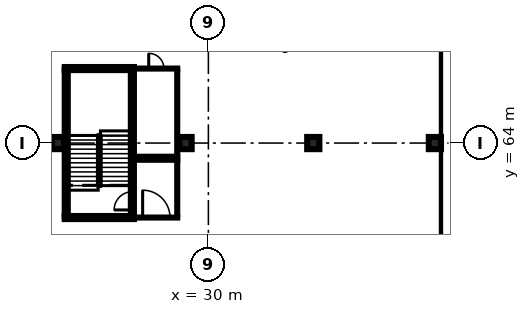
"""IFC4 building model, lengths in metres.
Left out: names, types, materials, properties, quantities, classifications, styles, units other than length and angle.
Written with IfcOpenShell. Run it as: python <this file> out.ifc"""

import sys

from ifc_helpers import new_model, si_unit, direction, frame, frame_2d, origin, origin_2d, place, context, subcontext, project, spatial, rectangle, extrude, element, fill, save


model = new_model("IFC4")
c1 = context("Model", 3, precision=1e-05, world=origin(), true_north=direction((0.0, 1.0)))
c2 = subcontext(c1, "Body", "Model", "MODEL_VIEW")
j1 = project(units=[si_unit("LENGTHUNIT", "METRE"), si_unit("PLANEANGLEUNIT", "RADIAN")], contexts=[c1])
p1 = place(None, origin())
s1 = spatial("IfcSite", under=j1, at=p1, CompositionType="ELEMENT")
p2 = place(p1, origin())
s2 = spatial("IfcBuilding", under=s1, at=p2, CompositionType="ELEMENT")
p3 = place(p2, frame((0.0, 0.0, -12.0)))
s3 = spatial("IfcBuildingStorey", under=s2, at=p3, CompositionType="ELEMENT", Elevation=-12.0)
p4 = place(p3, frame((45.75, -80.0, 0.0), z_axis=(0.0, 0.0, 1.0), x_axis=(0.0, 1.0, 0.0)))
e1 = element("IfcWall", 1, at=p4, inside=s3, PredefinedType="USERDEFINED", context=c2, shape_type="SweptSolid", body=[
    extrude(rectangle(XDim=160.0, YDim=0.9, at=frame_2d((80.0, 0.0))), origin(), (0.0, 0.0, 1.0), 11.55),
])
p5 = place(p2, frame((0.0, 0.0, -3.6)))
s4 = spatial("IfcBuildingStorey", under=s2, at=p5, CompositionType="ELEMENT", Elevation=-3.6)
for number, where, z_axis, x_axis in (
    (2, (20.1, 64.0, -0.4), (0.0, 0.0, 1.0), (1.0, 0.0, 0.0)),
    (3, (28.5, 64.0, -0.4), (0.0, 0.0, 1.0), (1.0, 0.0, 0.0)),
    (4, (36.9, 64.0, -0.4), (0.0, 0.0, 1.0), (1.0, 0.0, 0.0)),
    (5, (44.9, 64.0, -0.4), (0.0, 0.0, 1.0), (1.0, 0.0, 0.0)),
):
    element("IfcColumn", number, at=place(p5, frame(where, z_axis=z_axis, x_axis=x_axis)), inside=s4, PredefinedType="COLUMN", context=c2, shape_type="SweptSolid", body=[
        extrude(rectangle(XDim=0.8, YDim=0.8, at=origin_2d()), origin(), (0.0, 0.0, 1.0), 3.55),
    ])
p6 = place(p5, frame((25.1, 59.1, 0.0), z_axis=(0.0, 0.0, 1.0), x_axis=(1.0, 0.0, 0.0)))
e6 = element("IfcWall", 6, at=p6, inside=s4, PredefinedType="PARTITIONING", context=c2, shape_type="SweptSolid", body=[
    extrude(rectangle(XDim=2.95, YDim=0.2, at=frame_2d((1.475, 0.0))), origin(), (0.0, 0.0, 1.0), 3.15),
])
p7 = place(p6, frame((0.575, 0.0, 0.0)))
e7 = element("IfcOpeningElement", 7, at=p7, cuts=e6, PredefinedType="OPENING", context=c2, shape_type="SweptSolid", body=[
    extrude(rectangle(XDim=1.8, YDim=2.1, at=frame_2d((0.9, 1.05))), frame((0.0, 0.11, 0.0), z_axis=(0.0, -1.0, 0.0), x_axis=(1.0, 0.0, 0.0)), (0.0, 0.0, 1.0), 0.22),
])
p8 = place(p5, frame((25.1, 62.9, 0.0), z_axis=(0.0, 0.0, 1.0), x_axis=(1.0, 0.0, 0.0)))
e8 = element("IfcWall", 8, at=p8, inside=s4, PredefinedType="PARTITIONING", context=c2, shape_type="SweptSolid", body=[
    extrude(rectangle(XDim=2.95, YDim=0.2, at=frame_2d((1.475, 0.0))), origin(), (0.0, 0.0, 1.0), 3.15),
])
p9 = place(p5, frame((27.95, 59.2, 0.0), z_axis=(0.0, 0.0, 1.0), x_axis=(0.0, 1.0, 0.0)))
e9 = element("IfcWall", 9, at=p9, inside=s4, PredefinedType="PARTITIONING", context=c2, shape_type="SweptSolid", body=[
    extrude(rectangle(XDim=3.6, YDim=0.2, at=frame_2d((1.8, 0.0))), origin(), (0.0, 0.0, 1.0), 3.15),
])
p10 = place(p5, frame((25.1, 63.1, 0.0), z_axis=(0.0, 0.0, 1.0), x_axis=(1.0, 0.0, 0.0)))
e10 = element("IfcWall", 10, at=p10, inside=s4, PredefinedType="PARTITIONING", context=c2, shape_type="SweptSolid", body=[
    extrude(rectangle(XDim=2.95, YDim=0.2, at=frame_2d((1.475, 0.0))), origin(), (0.0, 0.0, 1.0), 3.15),
])
p11 = place(p5, frame((25.1, 68.9, 0.0), z_axis=(0.0, 0.0, 1.0), x_axis=(1.0, 0.0, 0.0)))
e11 = element("IfcWall", 11, at=p11, inside=s4, PredefinedType="PARTITIONING", context=c2, shape_type="SweptSolid", body=[
    extrude(rectangle(XDim=2.95, YDim=0.2, at=frame_2d((1.475, 0.0))), origin(), (0.0, 0.0, 1.0), 3.15),
])
p12 = place(p11, frame((0.975, 0.0, 0.0)))
e12 = element("IfcOpeningElement", 12, at=p12, cuts=e11, PredefinedType="OPENING", context=c2, shape_type="SweptSolid", body=[
    extrude(rectangle(XDim=1.0, YDim=2.1, at=frame_2d((0.5, 1.05))), frame((0.0, 0.11, 0.0), z_axis=(0.0, -1.0, 0.0), x_axis=(1.0, 0.0, 0.0)), (0.0, 0.0, 1.0), 0.22),
])
p13 = place(p5, frame((27.95, 63.2, 0.0), z_axis=(0.0, 0.0, 1.0), x_axis=(0.0, 1.0, 0.0)))
e13 = element("IfcWall", 13, at=p13, inside=s4, PredefinedType="PARTITIONING", context=c2, shape_type="SweptSolid", body=[
    extrude(rectangle(XDim=5.6, YDim=0.2, at=frame_2d((2.8, 0.0))), origin(), (0.0, 0.0, 1.0), 3.15),
])
p14 = place(p5, frame((20.65, 59.2, 0.0), z_axis=(0.0, 0.0, 1.0), x_axis=(0.0, 1.0, 0.0)))
e14 = element("IfcWall", 14, at=p14, inside=s4, PredefinedType="SOLIDWALL", context=c2, shape_type="SweptSolid", body=[
    extrude(rectangle(XDim=9.6, YDim=0.2, at=frame_2d((4.8, 0.0))), origin(), (0.0, 0.0, 1.0), 3.15),
])
p15 = place(p5, frame((25.0, 59.2, 0.0), z_axis=(0.0, 0.0, 1.0), x_axis=(0.0, 1.0, 0.0)))
e15 = element("IfcWall", 15, at=p15, inside=s4, PredefinedType="SOLIDWALL", context=c2, shape_type="SweptSolid", body=[
    extrude(rectangle(XDim=9.6, YDim=0.2, at=frame_2d((4.8, 0.0))), origin(), (0.0, 0.0, 1.0), 3.15),
])
p16 = place(p15, frame((0.4, 0.0, 0.0)))
e16 = element("IfcOpeningElement", 16, at=p16, cuts=e15, PredefinedType="OPENING", context=c2, shape_type="SweptSolid", body=[
    extrude(rectangle(XDim=1.2, YDim=2.1, at=frame_2d((0.6, 1.05))), frame((0.0, 0.11, 0.0), z_axis=(0.0, -1.0, 0.0), x_axis=(1.0, 0.0, 0.0)), (0.0, 0.0, 1.0), 0.22),
])
for number, where, z_axis, x_axis in (
    (17, (25.1, 59.1, 0.0), (0.0, 0.0, 1.0), (-1.0, 0.0, 0.0)),
    (18, (20.55, 68.9, 0.0), (0.0, 0.0, 1.0), (1.0, 0.0, 0.0)),
):
    element("IfcWall", number, at=place(p5, frame(where, z_axis=z_axis, x_axis=x_axis)), inside=s4, PredefinedType="SOLIDWALL", context=c2, shape_type="SweptSolid", body=[
        extrude(rectangle(XDim=4.55, YDim=0.2, at=frame_2d((2.275, 0.0))), origin(), (0.0, 0.0, 1.0), 3.15),
    ])
p17 = place(p7, origin())
e19 = element("IfcDoor", 19, at=p17, inside=s4, OperationType="DOUBLE_DOOR_SINGLE_SWING", PredefinedType="DOOR", context=c2, shape_type="SweptSolid", body=[
    extrude(rectangle(XDim=1.8, YDim=2.1, at=frame_2d((0.9, 1.05))), frame((0.0, 0.025, 0.0), z_axis=(0.0, -1.0, 0.0), x_axis=(1.0, 0.0, 0.0)), (0.0, 0.0, 1.0), 0.05),
])
fill(e7, e19)
p18 = place(p12, origin())
e20 = element("IfcDoor", 20, at=p18, inside=s4, OperationType="SINGLE_SWING_LEFT", PredefinedType="DOOR", context=c2, shape_type="SweptSolid", body=[
    extrude(rectangle(XDim=1.0, YDim=2.1, at=frame_2d((0.5, 1.05))), frame((0.0, 0.025, 0.0), z_axis=(0.0, -1.0, 0.0), x_axis=(1.0, 0.0, 0.0)), (0.0, 0.0, 1.0), 0.05),
])
fill(e12, e20)
p19 = place(p16, origin())
e21 = element("IfcDoor", 21, at=p19, inside=s4, OperationType="SINGLE_SWING_LEFT", PredefinedType="DOOR", context=c2, shape_type="SweptSolid", body=[
    extrude(rectangle(XDim=1.2, YDim=2.1, at=frame_2d((0.6, 1.05))), frame((0.0, 0.025, 0.0), z_axis=(0.0, -1.0, 0.0), x_axis=(1.0, 0.0, 0.0)), (0.0, 0.0, 1.0), 0.05),
])
fill(e16, e21)
save(model, sys.argv[1])
